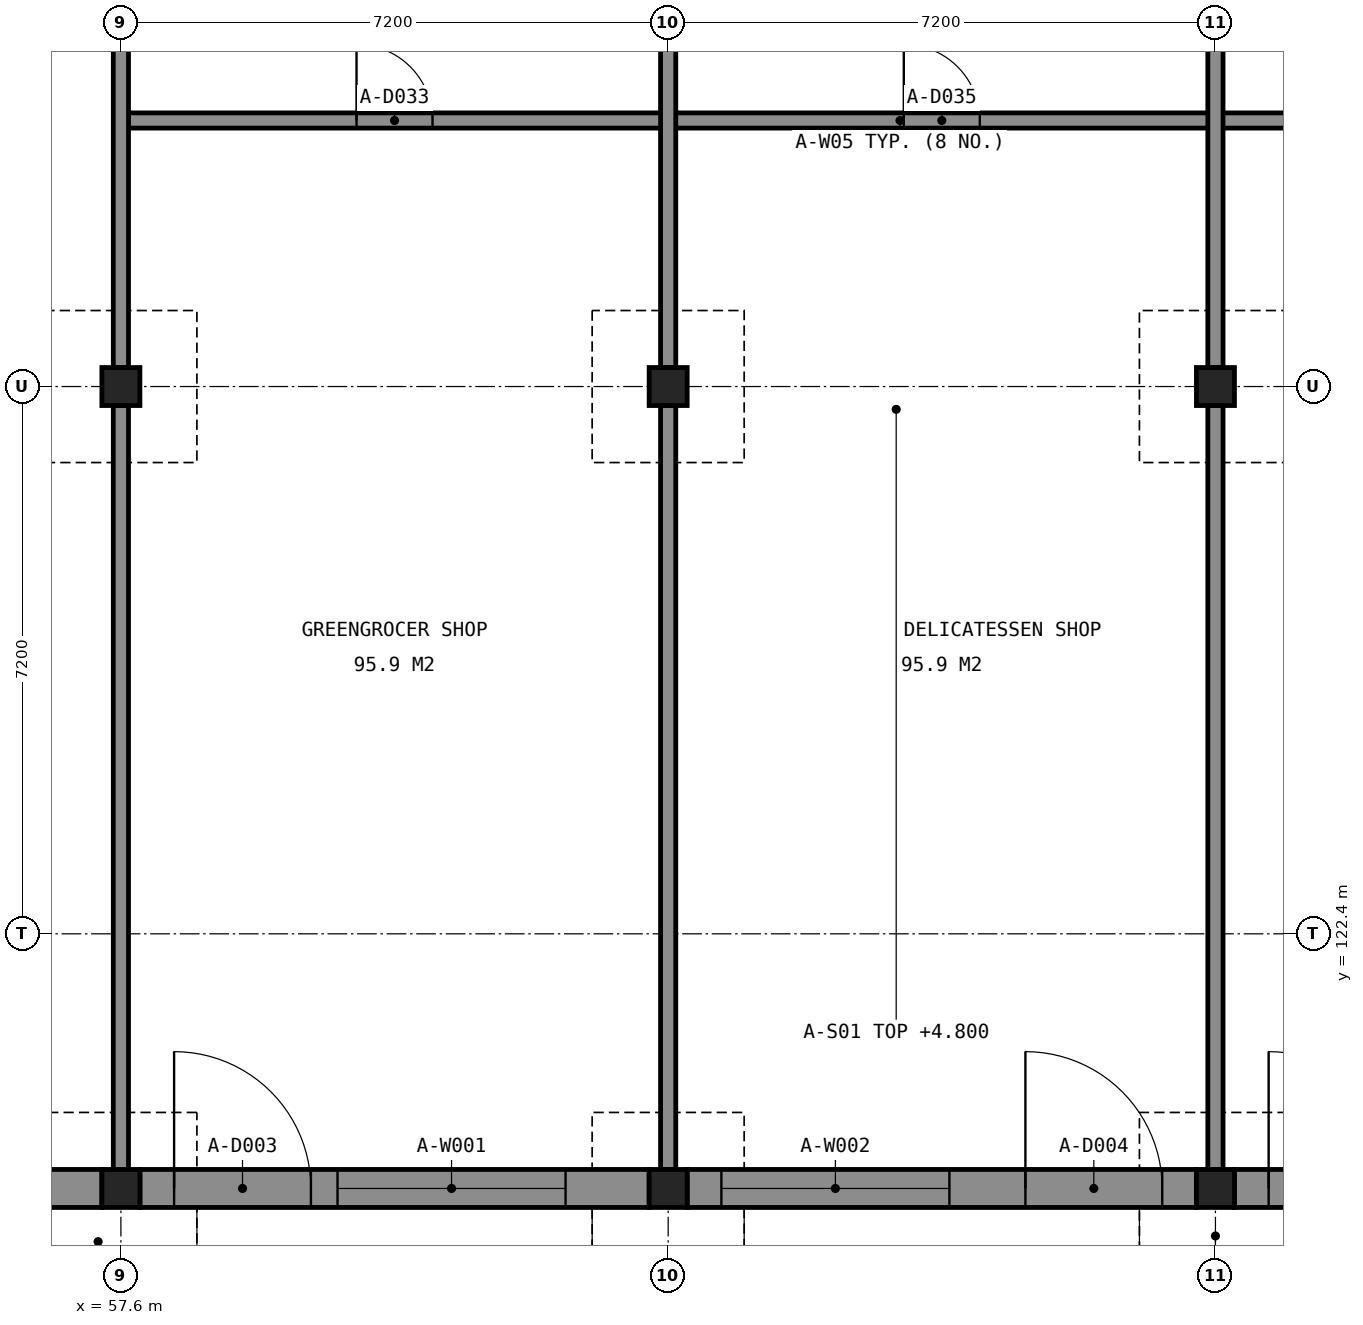
"""IFC4 building model, lengths in metres.
Left out: names, types, materials, properties, quantities, classifications, styles, units other than length and angle.
Written with IfcOpenShell. Run it as: python <this file> out.ifc"""

import sys

from ifc_helpers import new_model, si_unit, direction, frame, frame_2d, origin, origin_2d, place, context, subcontext, project, spatial, rectangle, extrude, element, fill, save


model = new_model("IFC4")
c1 = context("Model", 3, precision=1e-05, world=origin(), true_north=direction((0.0, 1.0)))
c2 = subcontext(c1, "Body", "Model", "MODEL_VIEW")
j1 = project(units=[si_unit("LENGTHUNIT", "METRE"), si_unit("PLANEANGLEUNIT", "RADIAN")], contexts=[c1])
p1 = place(None, origin())
s1 = spatial("IfcSite", under=j1, at=p1, CompositionType="ELEMENT")
p2 = place(p1, origin())
s2 = spatial("IfcBuilding", under=s1, at=p2, CompositionType="ELEMENT")
p3 = place(p2, origin())
s3 = spatial("IfcBuildingStorey", under=s2, at=p3, CompositionType="ELEMENT", Elevation=0.0)
for number, where, z_axis, x_axis in (
    (1, (57.6, 119.05, 0.0), (0.0, 0.0, 1.0), (1.0, 0.0, 0.0)),
    (2, (64.8, 119.05, 0.0), (0.0, 0.0, 1.0), (1.0, 0.0, 0.0)),
    (3, (72.0, 119.05, 0.0), (0.0, 0.0, 1.0), (1.0, 0.0, 0.0)),
    (4, (57.6, 129.6, 0.0), (0.0, 0.0, 1.0), (1.0, 0.0, 0.0)),
    (5, (64.8, 129.6, 0.0), (0.0, 0.0, 1.0), (1.0, 0.0, 0.0)),
    (6, (72.0, 129.6, 0.0), (0.0, 0.0, 1.0), (1.0, 0.0, 0.0)),
):
    element("IfcColumn", number, at=place(p3, frame(where, z_axis=z_axis, x_axis=x_axis)), inside=s3, PredefinedType="COLUMN", context=c2, shape_type="SweptSolid", body=[
        extrude(rectangle(XDim=0.5, YDim=0.5, at=origin_2d()), origin(), (0.0, 0.0, 1.0), 3.7),
    ])
p4 = place(p3, frame((50.9, 119.05, 0.0), z_axis=(0.0, 0.0, 1.0), x_axis=(1.0, 0.0, 0.0)))
e7 = element("IfcWall", 7, at=p4, inside=s3, PredefinedType="SOLIDWALL", context=c2, shape_type="SweptSolid", body=[
    extrude(rectangle(XDim=6.45, YDim=0.5, at=frame_2d((3.225, 0.0))), origin(), (0.0, 0.0, 1.0), 3.6),
])
p5 = place(p4, frame((2.0, 0.0, 0.0), z_axis=(0.0, 0.0, 1.0), x_axis=(-1.0, 0.0, 0.0)))
e8 = element("IfcOpeningElement", 8, at=p5, cuts=e7, PredefinedType="OPENING", context=c2, shape_type="SweptSolid", body=[
    extrude(rectangle(XDim=1.2, YDim=2.1, at=frame_2d((0.6, 1.05))), frame((0.0, 0.26, 0.0), z_axis=(0.0, -1.0, 0.0), x_axis=(1.0, 0.0, 0.0)), (0.0, 0.0, 1.0), 0.52),
])
p6 = place(p3, frame((57.85, 119.05, 0.0), z_axis=(0.0, 0.0, 1.0), x_axis=(1.0, 0.0, 0.0)))
e9 = element("IfcWall", 9, at=p6, inside=s3, PredefinedType="SOLIDWALL", context=c2, shape_type="SweptSolid", body=[
    extrude(rectangle(XDim=6.7, YDim=0.5, at=frame_2d((3.35, 0.0))), origin(), (0.0, 0.0, 1.0), 3.6),
])
p7 = place(p6, frame((0.45, 0.0, 0.0)))
e10 = element("IfcOpeningElement", 10, at=p7, cuts=e9, PredefinedType="OPENING", context=c2, shape_type="SweptSolid", body=[
    extrude(rectangle(XDim=1.8, YDim=2.4, at=frame_2d((0.9, 1.2))), frame((0.0, 0.26, 0.0), z_axis=(0.0, -1.0, 0.0), x_axis=(1.0, 0.0, 0.0)), (0.0, 0.0, 1.0), 0.52),
])
p8 = place(p6, frame((2.6, 0.0, 0.6)))
e11 = element("IfcOpeningElement", 11, at=p8, cuts=e9, PredefinedType="OPENING", context=c2, shape_type="SweptSolid", body=[
    extrude(rectangle(XDim=3.0, YDim=2.4, at=frame_2d((1.5, 1.2))), frame((0.0, 0.26, 0.0), z_axis=(0.0, -1.0, 0.0), x_axis=(1.0, 0.0, 0.0)), (0.0, 0.0, 1.0), 0.52),
])
p9 = place(p3, frame((65.05, 119.05, 0.0), z_axis=(0.0, 0.0, 1.0), x_axis=(1.0, 0.0, 0.0)))
e12 = element("IfcWall", 12, at=p9, inside=s3, PredefinedType="SOLIDWALL", context=c2, shape_type="SweptSolid", body=[
    extrude(rectangle(XDim=6.7, YDim=0.5, at=frame_2d((3.35, 0.0))), origin(), (0.0, 0.0, 1.0), 3.6),
])
p10 = place(p9, frame((4.45, 0.0, 0.0)))
e13 = element("IfcOpeningElement", 13, at=p10, cuts=e12, PredefinedType="OPENING", context=c2, shape_type="SweptSolid", body=[
    extrude(rectangle(XDim=1.8, YDim=2.4, at=frame_2d((0.9, 1.2))), frame((0.0, 0.26, 0.0), z_axis=(0.0, -1.0, 0.0), x_axis=(1.0, 0.0, 0.0)), (0.0, 0.0, 1.0), 0.52),
])
p11 = place(p9, frame((0.45, 0.0, 0.6)))
e14 = element("IfcOpeningElement", 14, at=p11, cuts=e12, PredefinedType="OPENING", context=c2, shape_type="SweptSolid", body=[
    extrude(rectangle(XDim=3.0, YDim=2.4, at=frame_2d((1.5, 1.2))), frame((0.0, 0.26, 0.0), z_axis=(0.0, -1.0, 0.0), x_axis=(1.0, 0.0, 0.0)), (0.0, 0.0, 1.0), 0.52),
])
p12 = place(p3, frame((72.25, 119.05, 0.0), z_axis=(0.0, 0.0, 1.0), x_axis=(1.0, 0.0, 0.0)))
e15 = element("IfcWall", 15, at=p12, inside=s3, PredefinedType="SOLIDWALL", context=c2, shape_type="SweptSolid", body=[
    extrude(rectangle(XDim=6.7, YDim=0.5, at=frame_2d((3.35, 0.0))), origin(), (0.0, 0.0, 1.0), 3.6),
])
p13 = place(p12, frame((0.45, 0.0, 0.0)))
e16 = element("IfcOpeningElement", 16, at=p13, cuts=e15, PredefinedType="OPENING", context=c2, shape_type="SweptSolid", body=[
    extrude(rectangle(XDim=1.8, YDim=2.4, at=frame_2d((0.9, 1.2))), frame((0.0, 0.26, 0.0), z_axis=(0.0, -1.0, 0.0), x_axis=(1.0, 0.0, 0.0)), (0.0, 0.0, 1.0), 0.52),
])
p14 = place(p12, frame((2.6, 0.0, 0.6)))
e17 = element("IfcOpeningElement", 17, at=p14, cuts=e15, PredefinedType="OPENING", context=c2, shape_type="SweptSolid", body=[
    extrude(rectangle(XDim=3.0, YDim=2.4, at=frame_2d((1.5, 1.2))), frame((0.0, 0.26, 0.0), z_axis=(0.0, -1.0, 0.0), x_axis=(1.0, 0.0, 0.0)), (0.0, 0.0, 1.0), 0.52),
])
p15 = place(p3, frame((57.7, 133.1, 0.0), z_axis=(0.0, 0.0, 1.0), x_axis=(1.0, 0.0, 0.0)))
e18 = element("IfcWall", 18, at=p15, inside=s3, PredefinedType="PARTITIONING", context=c2, shape_type="SweptSolid", body=[
    extrude(rectangle(XDim=86.2, YDim=0.2, at=frame_2d((43.1, 0.0))), origin(), (0.0, 0.0, 1.0), 3.5),
])
p16 = place(p15, frame((3.0, 0.0, 0.0)))
e19 = element("IfcOpeningElement", 19, at=p16, cuts=e18, PredefinedType="OPENING", context=c2, shape_type="SweptSolid", body=[
    extrude(rectangle(XDim=1.0, YDim=2.1, at=frame_2d((0.5, 1.05))), frame((0.0, 0.11, 0.0), z_axis=(0.0, -1.0, 0.0), x_axis=(1.0, 0.0, 0.0)), (0.0, 0.0, 1.0), 0.22),
])
p17 = place(p15, frame((10.2, 0.0, 0.0)))
e20 = element("IfcOpeningElement", 20, at=p17, cuts=e18, PredefinedType="OPENING", context=c2, shape_type="SweptSolid", body=[
    extrude(rectangle(XDim=1.0, YDim=2.1, at=frame_2d((0.5, 1.05))), frame((0.0, 0.11, 0.0), z_axis=(0.0, -1.0, 0.0), x_axis=(1.0, 0.0, 0.0)), (0.0, 0.0, 1.0), 0.22),
])
p18 = place(p15, frame((17.4, 0.0, 0.0)))
e21 = element("IfcOpeningElement", 21, at=p18, cuts=e18, PredefinedType="OPENING", context=c2, shape_type="SweptSolid", body=[
    extrude(rectangle(XDim=1.0, YDim=2.1, at=frame_2d((0.5, 1.05))), frame((0.0, 0.11, 0.0), z_axis=(0.0, -1.0, 0.0), x_axis=(1.0, 0.0, 0.0)), (0.0, 0.0, 1.0), 0.22),
])
p19 = place(p15, frame((24.6, 0.0, 0.0)))
e22 = element("IfcOpeningElement", 22, at=p19, cuts=e18, PredefinedType="OPENING", context=c2, shape_type="SweptSolid", body=[
    extrude(rectangle(XDim=1.0, YDim=2.1, at=frame_2d((0.5, 1.05))), frame((0.0, 0.11, 0.0), z_axis=(0.0, -1.0, 0.0), x_axis=(1.0, 0.0, 0.0)), (0.0, 0.0, 1.0), 0.22),
])
p20 = place(p15, frame((31.8, 0.0, 0.0)))
e23 = element("IfcOpeningElement", 23, at=p20, cuts=e18, PredefinedType="OPENING", context=c2, shape_type="SweptSolid", body=[
    extrude(rectangle(XDim=1.0, YDim=2.1, at=frame_2d((0.5, 1.05))), frame((0.0, 0.11, 0.0), z_axis=(0.0, -1.0, 0.0), x_axis=(1.0, 0.0, 0.0)), (0.0, 0.0, 1.0), 0.22),
])
p21 = place(p15, frame((39.0, 0.0, 0.0)))
e24 = element("IfcOpeningElement", 24, at=p21, cuts=e18, PredefinedType="OPENING", context=c2, shape_type="SweptSolid", body=[
    extrude(rectangle(XDim=1.0, YDim=2.1, at=frame_2d((0.5, 1.05))), frame((0.0, 0.11, 0.0), z_axis=(0.0, -1.0, 0.0), x_axis=(1.0, 0.0, 0.0)), (0.0, 0.0, 1.0), 0.22),
])
p22 = place(p15, frame((46.2, 0.0, 0.0)))
e25 = element("IfcOpeningElement", 25, at=p22, cuts=e18, PredefinedType="OPENING", context=c2, shape_type="SweptSolid", body=[
    extrude(rectangle(XDim=1.0, YDim=2.1, at=frame_2d((0.5, 1.05))), frame((0.0, 0.11, 0.0), z_axis=(0.0, -1.0, 0.0), x_axis=(1.0, 0.0, 0.0)), (0.0, 0.0, 1.0), 0.22),
])
p23 = place(p15, frame((53.4, 0.0, 0.0)))
e26 = element("IfcOpeningElement", 26, at=p23, cuts=e18, PredefinedType="OPENING", context=c2, shape_type="SweptSolid", body=[
    extrude(rectangle(XDim=1.0, YDim=2.1, at=frame_2d((0.5, 1.05))), frame((0.0, 0.11, 0.0), z_axis=(0.0, -1.0, 0.0), x_axis=(1.0, 0.0, 0.0)), (0.0, 0.0, 1.0), 0.22),
])
p24 = place(p15, frame((60.6, 0.0, 0.0)))
e27 = element("IfcOpeningElement", 27, at=p24, cuts=e18, PredefinedType="OPENING", context=c2, shape_type="SweptSolid", body=[
    extrude(rectangle(XDim=1.0, YDim=2.1, at=frame_2d((0.5, 1.05))), frame((0.0, 0.11, 0.0), z_axis=(0.0, -1.0, 0.0), x_axis=(1.0, 0.0, 0.0)), (0.0, 0.0, 1.0), 0.22),
])
p25 = place(p15, frame((67.8, 0.0, 0.0)))
e28 = element("IfcOpeningElement", 28, at=p25, cuts=e18, PredefinedType="OPENING", context=c2, shape_type="SweptSolid", body=[
    extrude(rectangle(XDim=1.0, YDim=2.1, at=frame_2d((0.5, 1.05))), frame((0.0, 0.11, 0.0), z_axis=(0.0, -1.0, 0.0), x_axis=(1.0, 0.0, 0.0)), (0.0, 0.0, 1.0), 0.22),
])
p26 = place(p15, frame((75.0, 0.0, 0.0)))
e29 = element("IfcOpeningElement", 29, at=p26, cuts=e18, PredefinedType="OPENING", context=c2, shape_type="SweptSolid", body=[
    extrude(rectangle(XDim=1.0, YDim=2.1, at=frame_2d((0.5, 1.05))), frame((0.0, 0.11, 0.0), z_axis=(0.0, -1.0, 0.0), x_axis=(1.0, 0.0, 0.0)), (0.0, 0.0, 1.0), 0.22),
])
p27 = place(p15, frame((84.65, 0.0, 0.0)))
e30 = element("IfcOpeningElement", 30, at=p27, cuts=e18, PredefinedType="OPENING", context=c2, shape_type="SweptSolid", body=[
    extrude(rectangle(XDim=0.9, YDim=2.1, at=frame_2d((0.45, 1.05))), frame((0.0, 0.11, 0.0), z_axis=(0.0, -1.0, 0.0), x_axis=(1.0, 0.0, 0.0)), (0.0, 0.0, 1.0), 0.22),
])
p28 = place(p3, frame((57.6, 119.3, 0.0), z_axis=(0.0, 0.0, 1.0), x_axis=(0.0, 1.0, 0.0)))
e31 = element("IfcWall", 31, at=p28, inside=s3, PredefinedType="PARTITIONING", context=c2, shape_type="SweptSolid", body=[
    extrude(rectangle(XDim=10.05, YDim=0.2, at=frame_2d((5.025, 0.0))), origin(), (0.0, 0.0, 1.0), 3.5),
])
p29 = place(p3, frame((57.6, 129.85, 0.0), z_axis=(0.0, 0.0, 1.0), x_axis=(0.0, 1.0, 0.0)))
e32 = element("IfcWall", 32, at=p29, inside=s3, PredefinedType="PARTITIONING", context=c2, shape_type="SweptSolid", body=[
    extrude(rectangle(XDim=7.95, YDim=0.2, at=frame_2d((3.975, 0.0))), origin(), (0.0, 0.0, 1.0), 3.5),
])
p30 = place(p3, frame((64.8, 119.3, 0.0), z_axis=(0.0, 0.0, 1.0), x_axis=(0.0, 1.0, 0.0)))
e33 = element("IfcWall", 33, at=p30, inside=s3, PredefinedType="PARTITIONING", context=c2, shape_type="SweptSolid", body=[
    extrude(rectangle(XDim=10.05, YDim=0.2, at=frame_2d((5.025, 0.0))), origin(), (0.0, 0.0, 1.0), 3.5),
])
p31 = place(p3, frame((64.8, 129.85, 0.0), z_axis=(0.0, 0.0, 1.0), x_axis=(0.0, 1.0, 0.0)))
e34 = element("IfcWall", 34, at=p31, inside=s3, PredefinedType="PARTITIONING", context=c2, shape_type="SweptSolid", body=[
    extrude(rectangle(XDim=7.95, YDim=0.2, at=frame_2d((3.975, 0.0))), origin(), (0.0, 0.0, 1.0), 3.5),
])
p32 = place(p3, frame((72.0, 119.3, 0.0), z_axis=(0.0, 0.0, 1.0), x_axis=(0.0, 1.0, 0.0)))
e35 = element("IfcWall", 35, at=p32, inside=s3, PredefinedType="PARTITIONING", context=c2, shape_type="SweptSolid", body=[
    extrude(rectangle(XDim=10.05, YDim=0.2, at=frame_2d((5.025, 0.0))), origin(), (0.0, 0.0, 1.0), 3.5),
])
p33 = place(p3, frame((72.0, 129.85, 0.0), z_axis=(0.0, 0.0, 1.0), x_axis=(0.0, 1.0, 0.0)))
e36 = element("IfcWall", 36, at=p33, inside=s3, PredefinedType="PARTITIONING", context=c2, shape_type="SweptSolid", body=[
    extrude(rectangle(XDim=7.95, YDim=0.2, at=frame_2d((3.975, 0.0))), origin(), (0.0, 0.0, 1.0), 3.5),
])
p34 = place(p7, origin())
e37 = element("IfcDoor", 37, at=p34, inside=s3, OperationType="DOUBLE_DOOR_DOUBLE_SWING", PredefinedType="DOOR", context=c2, shape_type="SweptSolid", body=[
    extrude(rectangle(XDim=1.8, YDim=2.4, at=frame_2d((0.9, 1.2))), frame((0.0, 0.025, 0.0), z_axis=(0.0, -1.0, 0.0), x_axis=(1.0, 0.0, 0.0)), (0.0, 0.0, 1.0), 0.05),
])
fill(e10, e37)
p35 = place(p8, origin())
e38 = element("IfcWindow", 38, at=p35, inside=s3, PartitioningType="SINGLE_PANEL", PredefinedType="WINDOW", context=c2, shape_type="SweptSolid", body=[
    extrude(rectangle(XDim=3.0, YDim=2.4, at=frame_2d((1.5, 1.2))), frame((0.0, 0.03, 0.0), z_axis=(0.0, -1.0, 0.0), x_axis=(1.0, 0.0, 0.0)), (0.0, 0.0, 1.0), 0.06),
])
fill(e11, e38)
p36 = place(p10, origin())
e39 = element("IfcDoor", 39, at=p36, inside=s3, OperationType="DOUBLE_DOOR_DOUBLE_SWING", PredefinedType="DOOR", context=c2, shape_type="SweptSolid", body=[
    extrude(rectangle(XDim=1.8, YDim=2.4, at=frame_2d((0.9, 1.2))), frame((0.0, 0.025, 0.0), z_axis=(0.0, -1.0, 0.0), x_axis=(1.0, 0.0, 0.0)), (0.0, 0.0, 1.0), 0.05),
])
fill(e13, e39)
p37 = place(p11, origin())
e40 = element("IfcWindow", 40, at=p37, inside=s3, PartitioningType="SINGLE_PANEL", PredefinedType="WINDOW", context=c2, shape_type="SweptSolid", body=[
    extrude(rectangle(XDim=3.0, YDim=2.4, at=frame_2d((1.5, 1.2))), frame((0.0, 0.03, 0.0), z_axis=(0.0, -1.0, 0.0), x_axis=(1.0, 0.0, 0.0)), (0.0, 0.0, 1.0), 0.06),
])
fill(e14, e40)
p38 = place(p13, origin())
e41 = element("IfcDoor", 41, at=p38, inside=s3, OperationType="DOUBLE_DOOR_DOUBLE_SWING", PredefinedType="DOOR", context=c2, shape_type="SweptSolid", body=[
    extrude(rectangle(XDim=1.8, YDim=2.4, at=frame_2d((0.9, 1.2))), frame((0.0, 0.025, 0.0), z_axis=(0.0, -1.0, 0.0), x_axis=(1.0, 0.0, 0.0)), (0.0, 0.0, 1.0), 0.05),
])
fill(e16, e41)
p39 = place(p16, origin())
e42 = element("IfcDoor", 42, at=p39, inside=s3, OperationType="SINGLE_SWING_LEFT", PredefinedType="DOOR", context=c2, shape_type="SweptSolid", body=[
    extrude(rectangle(XDim=1.0, YDim=2.1, at=frame_2d((0.5, 1.05))), frame((0.0, 0.025, 0.0), z_axis=(0.0, -1.0, 0.0), x_axis=(1.0, 0.0, 0.0)), (0.0, 0.0, 1.0), 0.05),
])
fill(e19, e42)
p40 = place(p17, origin())
e43 = element("IfcDoor", 43, at=p40, inside=s3, OperationType="SINGLE_SWING_LEFT", PredefinedType="DOOR", context=c2, shape_type="SweptSolid", body=[
    extrude(rectangle(XDim=1.0, YDim=2.1, at=frame_2d((0.5, 1.05))), frame((0.0, 0.025, 0.0), z_axis=(0.0, -1.0, 0.0), x_axis=(1.0, 0.0, 0.0)), (0.0, 0.0, 1.0), 0.05),
])
fill(e20, e43)
save(model, sys.argv[1])
